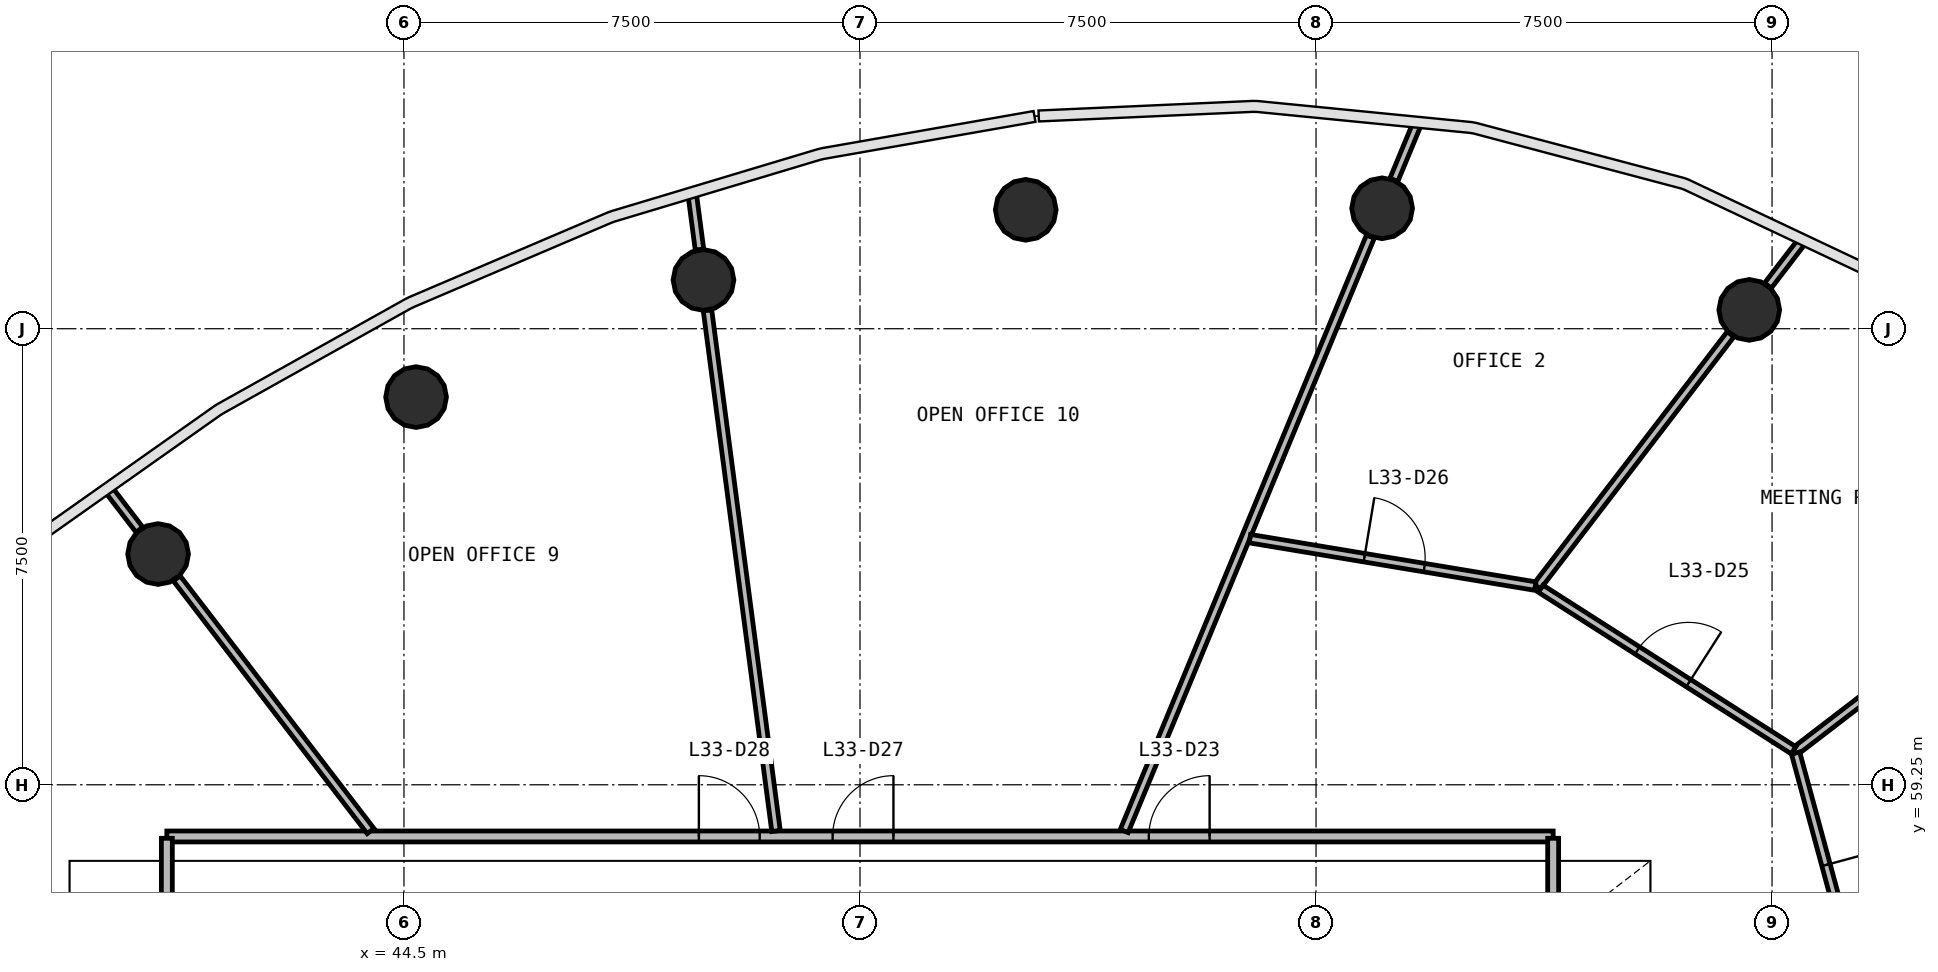
"""IFC4 building model, lengths in metres.
Left out: names, types, materials, properties, quantities, classifications, styles, units other than length and angle.
Written with IfcOpenShell. Run it as: python <this file> out.ifc"""

import sys

from ifc_helpers import new_model, si_unit, direction, frame, frame_2d, origin, origin_2d, place, context, subcontext, project, spatial, rectangle, circle, extrude, source, transform, mapped, element, fill, save


model = new_model("IFC4")
c1 = context("Model", 3, precision=1e-05, world=origin(), true_north=direction((0.0, 1.0)))
c2 = subcontext(c1, "Body", "Model", "MODEL_VIEW")
j1 = project(units=[si_unit("LENGTHUNIT", "METRE"), si_unit("PLANEANGLEUNIT", "RADIAN")], contexts=[c1])
p1 = place(None, origin())
s1 = spatial("IfcSite", under=j1, at=p1, CompositionType="ELEMENT")
p2 = place(p1, origin())
s2 = spatial("IfcBuilding", under=s1, at=p2, CompositionType="ELEMENT")
p3 = place(p2, frame((0.0, 0.0, 140.9)))
s3 = spatial("IfcBuildingStorey", under=s2, at=p3, CompositionType="ELEMENT", Elevation=140.9)
m1 = source(origin(), c2, "Body", "SweptSolid", [
    extrude(circle(Radius=0.5, at=origin_2d()), origin(), (0.0, 0.0, 1.0), 3.9),
])
for number, where, z_axis, x_axis in (
    (1, (66.625, 67.06, 0.0), (0.0, 0.0, 1.0), (1.0, 0.0, 0.0)),
    (2, (60.587, 68.731, 0.0), (0.0, 0.0, 1.0), (1.0, 0.0, 0.0)),
    (3, (54.726, 68.705, 0.0), (0.0, 0.0, 1.0), (1.0, 0.0, 0.0)),
    (4, (49.426, 67.551, 0.0), (0.0, 0.0, 1.0), (1.0, 0.0, 0.0)),
    (5, (44.699, 65.626, 0.0), (0.0, 0.0, 1.0), (1.0, 0.0, 0.0)),
    (6, (40.456, 63.044, 0.0), (0.0, 0.0, 1.0), (1.0, 0.0, 0.0)),
):
    element("IfcColumn", number, at=place(p3, frame(where, z_axis=z_axis, x_axis=x_axis)), inside=s3, PredefinedType="COLUMN", context=c2, shape_type="MappedRepresentation", body=[
        mapped(m1, transform((0.0, 0.0, 0.0), scale=1.0)),
    ])
p4 = place(p3, frame((40.6, 58.4, 0.0), z_axis=(0.0, 0.0, 1.0), x_axis=(1.0, 0.0, 0.0)))
e7 = element("IfcWall", 7, at=p4, inside=s3, PredefinedType="PARTITIONING", context=c2, shape_type="SweptSolid", body=[
    extrude(rectangle(XDim=22.8, YDim=0.18, at=frame_2d((11.4, 0.0))), origin(), (0.0, 0.0, 1.0), 2.88),
])
p5 = place(p4, frame((16.15, 0.0, 0.0)))
e8 = element("IfcOpeningElement", 8, at=p5, cuts=e7, PredefinedType="OPENING", context=c2, shape_type="SweptSolid", body=[
    extrude(rectangle(XDim=1.0, YDim=2.1, at=frame_2d((0.5, 1.05))), frame((0.0, 0.1, 0.0), z_axis=(0.0, -1.0, 0.0), x_axis=(1.0, 0.0, 0.0)), (0.0, 0.0, 1.0), 0.2),
])
p6 = place(p4, frame((10.95, 0.0, 0.0)))
e9 = element("IfcOpeningElement", 9, at=p6, cuts=e7, PredefinedType="OPENING", context=c2, shape_type="SweptSolid", body=[
    extrude(rectangle(XDim=1.0, YDim=2.1, at=frame_2d((0.5, 1.05))), frame((0.0, 0.1, 0.0), z_axis=(0.0, -1.0, 0.0), x_axis=(1.0, 0.0, 0.0)), (0.0, 0.0, 1.0), 0.2),
])
p7 = place(p4, frame((8.75, 0.0, 0.0)))
e10 = element("IfcOpeningElement", 10, at=p7, cuts=e7, PredefinedType="OPENING", context=c2, shape_type="SweptSolid", body=[
    extrude(rectangle(XDim=1.0, YDim=2.1, at=frame_2d((0.5, 1.05))), frame((0.0, 0.1, 0.0), z_axis=(0.0, -1.0, 0.0), x_axis=(1.0, 0.0, 0.0)), (0.0, 0.0, 1.0), 0.2),
])
p8 = place(p3, frame((63.4, 58.37, 0.0), z_axis=(0.0, 0.0, 1.0), x_axis=(0.0, -1.0, 0.0)))
e11 = element("IfcWall", 11, at=p8, inside=s3, PredefinedType="PARTITIONING", context=c2, shape_type="SweptSolid", body=[
    extrude(rectangle(XDim=20.74, YDim=0.18, at=frame_2d((10.37, 0.0))), origin(), (0.0, 0.0, 1.0), 2.88),
])
p9 = place(p8, frame((15.39, 0.0, 0.0)))
e12 = element("IfcOpeningElement", 12, at=p9, cuts=e11, PredefinedType="OPENING", context=c2, shape_type="SweptSolid", body=[
    extrude(rectangle(XDim=0.9, YDim=2.1, at=frame_2d((0.45, 1.05))), frame((0.0, 0.1, 0.0), z_axis=(0.0, -1.0, 0.0), x_axis=(1.0, 0.0, 0.0)), (0.0, 0.0, 1.0), 0.2),
])
p10 = place(p8, frame((12.19, 0.0, 0.0)))
e13 = element("IfcOpeningElement", 13, at=p10, cuts=e11, PredefinedType="OPENING", context=c2, shape_type="SweptSolid", body=[
    extrude(rectangle(XDim=0.9, YDim=2.1, at=frame_2d((0.45, 1.05))), frame((0.0, 0.1, 0.0), z_axis=(0.0, -1.0, 0.0), x_axis=(1.0, 0.0, 0.0)), (0.0, 0.0, 1.0), 0.2),
])
p11 = place(p8, frame((9.89, 0.0, 0.0)))
e14 = element("IfcOpeningElement", 14, at=p11, cuts=e11, PredefinedType="OPENING", context=c2, shape_type="SweptSolid", body=[
    extrude(rectangle(XDim=1.0, YDim=2.1, at=frame_2d((0.5, 1.05))), frame((0.0, 0.1, 0.0), z_axis=(0.0, -1.0, 0.0), x_axis=(1.0, 0.0, 0.0)), (0.0, 0.0, 1.0), 0.2),
])
p12 = place(p3, frame((40.6, 37.63, 0.0), z_axis=(0.0, 0.0, 1.0), x_axis=(0.0, 1.0, 0.0)))
e15 = element("IfcWall", 15, at=p12, inside=s3, PredefinedType="PARTITIONING", context=c2, shape_type="SweptSolid", body=[
    extrude(rectangle(XDim=20.74, YDim=0.18, at=frame_2d((10.37, 0.0))), origin(), (0.0, 0.0, 1.0), 2.88),
])
p13 = place(p12, frame((9.89, 0.0, 0.0)))
e16 = element("IfcOpeningElement", 16, at=p13, cuts=e15, PredefinedType="OPENING", context=c2, shape_type="SweptSolid", body=[
    extrude(rectangle(XDim=1.0, YDim=2.1, at=frame_2d((0.5, 1.05))), frame((0.0, 0.1, 0.0), z_axis=(0.0, -1.0, 0.0), x_axis=(1.0, 0.0, 0.0)), (0.0, 0.0, 1.0), 0.2),
])
p14 = place(p12, frame((7.69, 0.0, 0.0)))
e17 = element("IfcOpeningElement", 17, at=p14, cuts=e15, PredefinedType="OPENING", context=c2, shape_type="SweptSolid", body=[
    extrude(rectangle(XDim=1.0, YDim=2.1, at=frame_2d((0.5, 1.05))), frame((0.0, 0.1, 0.0), z_axis=(0.0, -1.0, 0.0), x_axis=(1.0, 0.0, 0.0)), (0.0, 0.0, 1.0), 0.2),
])
p15 = place(p3, frame((60.394, 68.264, 0.0), z_axis=(0.0, 0.0, 1.0), x_axis=(-0.382674486363, -0.923883238016, 0.0)))
e18 = element("IfcWall", 18, at=p15, inside=s3, PredefinedType="PARTITIONING", context=c2, shape_type="SweptSolid", body=[
    extrude(rectangle(XDim=10.58, YDim=0.14, at=frame_2d((5.29, 0.0))), origin(), (0.0, 0.0, 1.0), 2.88),
])
p16 = place(p3, frame((50.619, 58.49, 0.0), z_axis=(0.0, 0.0, 1.0), x_axis=(-0.130507901859, 0.991447269174, 0.0)))
e19 = element("IfcWall", 19, at=p16, inside=s3, PredefinedType="PARTITIONING", context=c2, shape_type="SweptSolid", body=[
    extrude(rectangle(XDim=8.635, YDim=0.14, at=frame_2d((4.318, 0.0))), origin(), (0.0, 0.0, 1.0), 2.88),
])
p17 = place(p3, frame((43.951, 58.49, 0.0), z_axis=(0.0, 0.0, 1.0), x_axis=(-0.608736894437, 0.793372165728, 0.0)))
e20 = element("IfcWall", 20, at=p17, inside=s3, PredefinedType="PARTITIONING", context=c2, shape_type="SweptSolid", body=[
    extrude(rectangle(XDim=5.236, YDim=0.14, at=frame_2d((2.618, 0.0))), origin(), (0.0, 0.0, 1.0), 2.88),
])
p18 = place(p3, frame((63.136, 62.512, 0.0), z_axis=(0.0, 0.0, 1.0), x_axis=(0.608759991658, 0.793354443207, 0.0)))
e21 = element("IfcWall", 21, at=p18, inside=s3, PredefinedType="PARTITIONING", context=c2, shape_type="SweptSolid", body=[
    extrude(rectangle(XDim=5.227, YDim=0.14, at=frame_2d((2.613, 0.0))), origin(), (0.0, 0.0, 1.0), 2.88),
])
p19 = place(p3, frame((67.379, 59.801, 0.0), z_axis=(0.0, 0.0, 1.0), x_axis=(0.79338135979, 0.608724911547, 0.0)))
e22 = element("IfcWall", 22, at=p19, inside=s3, PredefinedType="PARTITIONING", context=c2, shape_type="SweptSolid", body=[
    extrude(rectangle(XDim=5.101, YDim=0.14, at=frame_2d((2.55, 0.0))), origin(), (0.0, 0.0, 1.0), 2.88),
])
p20 = place(p3, frame((67.387, 59.772, 0.0), z_axis=(0.0, 0.0, 1.0), x_axis=(0.262079708004, -0.965046230319, 0.0)))
e23 = element("IfcWall", 23, at=p20, inside=s3, PredefinedType="PARTITIONING", context=c2, shape_type="SweptSolid", body=[
    extrude(rectangle(XDim=4.958, YDim=0.14, at=frame_2d((2.479, 0.0))), origin(), (0.0, 0.0, 1.0), 2.88),
])
p21 = place(p20, frame((1.908, 0.0, 0.0)))
e24 = element("IfcOpeningElement", 24, at=p21, cuts=e23, PredefinedType="OPENING", context=c2, shape_type="SweptSolid", body=[
    extrude(rectangle(XDim=1.0, YDim=2.1, at=frame_2d((0.5, 1.05))), frame((0.0, 0.08, 0.0), z_axis=(0.0, -1.0, 0.0), x_axis=(1.0, 0.0, 0.0)), (0.0, 0.0, 1.0), 0.16),
])
p22 = place(p3, frame((63.195, 62.475, 0.0), z_axis=(0.0, 0.0, 1.0), x_axis=(0.842625182258, -0.538500512743, 0.0)))
e25 = element("IfcWall", 25, at=p22, inside=s3, PredefinedType="PARTITIONING", context=c2, shape_type="SweptSolid", body=[
    extrude(rectangle(XDim=4.935, YDim=0.14, at=frame_2d((2.468, 0.0))), origin(), (0.0, 0.0, 1.0), 2.88),
])
p23 = place(p22, frame((1.885, 0.0, 0.0)))
e26 = element("IfcOpeningElement", 26, at=p23, cuts=e25, PredefinedType="OPENING", context=c2, shape_type="SweptSolid", body=[
    extrude(rectangle(XDim=1.0, YDim=2.1, at=frame_2d((0.5, 1.05))), frame((0.0, 0.08, 0.0), z_axis=(0.0, -1.0, 0.0), x_axis=(1.0, 0.0, 0.0)), (0.0, 0.0, 1.0), 0.16),
])
p24 = place(p3, frame((58.412, 63.298, 0.0), z_axis=(0.0, 0.0, 1.0), x_axis=(0.986464551943, -0.163974655849, 0.0)))
e27 = element("IfcWall", 27, at=p24, inside=s3, PredefinedType="PARTITIONING", context=c2, shape_type="SweptSolid", body=[
    extrude(rectangle(XDim=4.759, YDim=0.14, at=frame_2d((2.379, 0.0))), origin(), (0.0, 0.0, 1.0), 2.88),
])
p25 = place(p24, frame((1.908, 0.0, 0.0)))
e28 = element("IfcOpeningElement", 28, at=p25, cuts=e27, PredefinedType="OPENING", context=c2, shape_type="SweptSolid", body=[
    extrude(rectangle(XDim=1.0, YDim=2.1, at=frame_2d((0.5, 1.05))), frame((0.0, 0.08, 0.0), z_axis=(0.0, -1.0, 0.0), x_axis=(1.0, 0.0, 0.0)), (0.0, 0.0, 1.0), 0.16),
])
p26 = place(p3, frame((60.78, 69.198, 0.0), z_axis=(0.0, 0.0, 1.0), x_axis=(0.382619989809, 0.923905808726, 0.0)))
e29 = element("IfcWall", 29, at=p26, inside=s3, PredefinedType="PARTITIONING", context=c2, shape_type="SweptSolid", body=[
    extrude(rectangle(XDim=0.965, YDim=0.14, at=frame_2d((0.482, 0.0))), origin(), (0.0, 0.0, 1.0), 2.88),
])
p27 = place(p3, frame((66.932, 67.46, 0.0), z_axis=(0.0, 0.0, 1.0), x_axis=(0.608853638779, 0.793282576731, 0.0)))
e30 = element("IfcWall", 30, at=p27, inside=s3, PredefinedType="PARTITIONING", context=c2, shape_type="SweptSolid", body=[
    extrude(rectangle(XDim=0.923, YDim=0.14, at=frame_2d((0.461, 0.0))), origin(), (0.0, 0.0, 1.0), 2.88),
])
p28 = place(p3, frame((49.36, 68.052, 0.0), z_axis=(0.0, 0.0, 1.0), x_axis=(-0.130404378549, 0.991460890835, 0.0)))
e31 = element("IfcWall", 31, at=p28, inside=s3, PredefinedType="PARTITIONING", context=c2, shape_type="SweptSolid", body=[
    extrude(rectangle(XDim=0.882, YDim=0.14, at=frame_2d((0.441, 0.0))), origin(), (0.0, 0.0, 1.0), 2.88),
])
p29 = place(p3, frame((40.149, 63.445, 0.0), z_axis=(0.0, 0.0, 1.0), x_axis=(-0.608760344495, 0.793354172467, 0.0)))
e32 = element("IfcWall", 32, at=p29, inside=s3, PredefinedType="PARTITIONING", context=c2, shape_type="SweptSolid", body=[
    extrude(rectangle(XDim=0.795, YDim=0.14, at=frame_2d((0.397, 0.0))), origin(), (0.0, 0.0, 1.0), 2.88),
])
m2 = source(origin(), c2, "Body", "SweptSolid", [
    extrude(rectangle(XDim=1.0, YDim=2.1, at=frame_2d((0.5, 1.05))), frame((0.0, 0.025, 0.0), z_axis=(0.0, -1.0, 0.0), x_axis=(1.0, 0.0, 0.0)), (0.0, 0.0, 1.0), 0.05),
])
p30 = place(p5, origin())
e33 = element("IfcDoor", 33, at=p30, inside=s3, OperationType="SINGLE_SWING_RIGHT", PredefinedType="DOOR", context=c2, shape_type="MappedRepresentation", body=[
    mapped(m2, transform((0.0, 0.0, 0.0), scale=1.0)),
])
fill(e8, e33)
p31 = place(p21, origin())
e34 = element("IfcDoor", 34, at=p31, inside=s3, OperationType="SINGLE_SWING_LEFT", PredefinedType="DOOR", context=c2, shape_type="MappedRepresentation", body=[
    mapped(m2, transform((0.0, 0.0, 0.0), scale=1.0)),
])
fill(e24, e34)
p32 = place(p23, origin())
e35 = element("IfcDoor", 35, at=p32, inside=s3, OperationType="SINGLE_SWING_RIGHT", PredefinedType="DOOR", context=c2, shape_type="MappedRepresentation", body=[
    mapped(m2, transform((0.0, 0.0, 0.0), scale=1.0)),
])
fill(e26, e35)
p33 = place(p25, origin())
e36 = element("IfcDoor", 36, at=p33, inside=s3, OperationType="SINGLE_SWING_LEFT", PredefinedType="DOOR", context=c2, shape_type="MappedRepresentation", body=[
    mapped(m2, transform((0.0, 0.0, 0.0), scale=1.0)),
])
fill(e28, e36)
p34 = place(p6, origin())
e37 = element("IfcDoor", 37, at=p34, inside=s3, OperationType="SINGLE_SWING_RIGHT", PredefinedType="DOOR", context=c2, shape_type="MappedRepresentation", body=[
    mapped(m2, transform((0.0, 0.0, 0.0), scale=1.0)),
])
fill(e9, e37)
p35 = place(p7, origin())
e38 = element("IfcDoor", 38, at=p35, inside=s3, OperationType="SINGLE_SWING_LEFT", PredefinedType="DOOR", context=c2, shape_type="MappedRepresentation", body=[
    mapped(m2, transform((0.0, 0.0, 0.0), scale=1.0)),
])
fill(e10, e38)
save(model, sys.argv[1])
